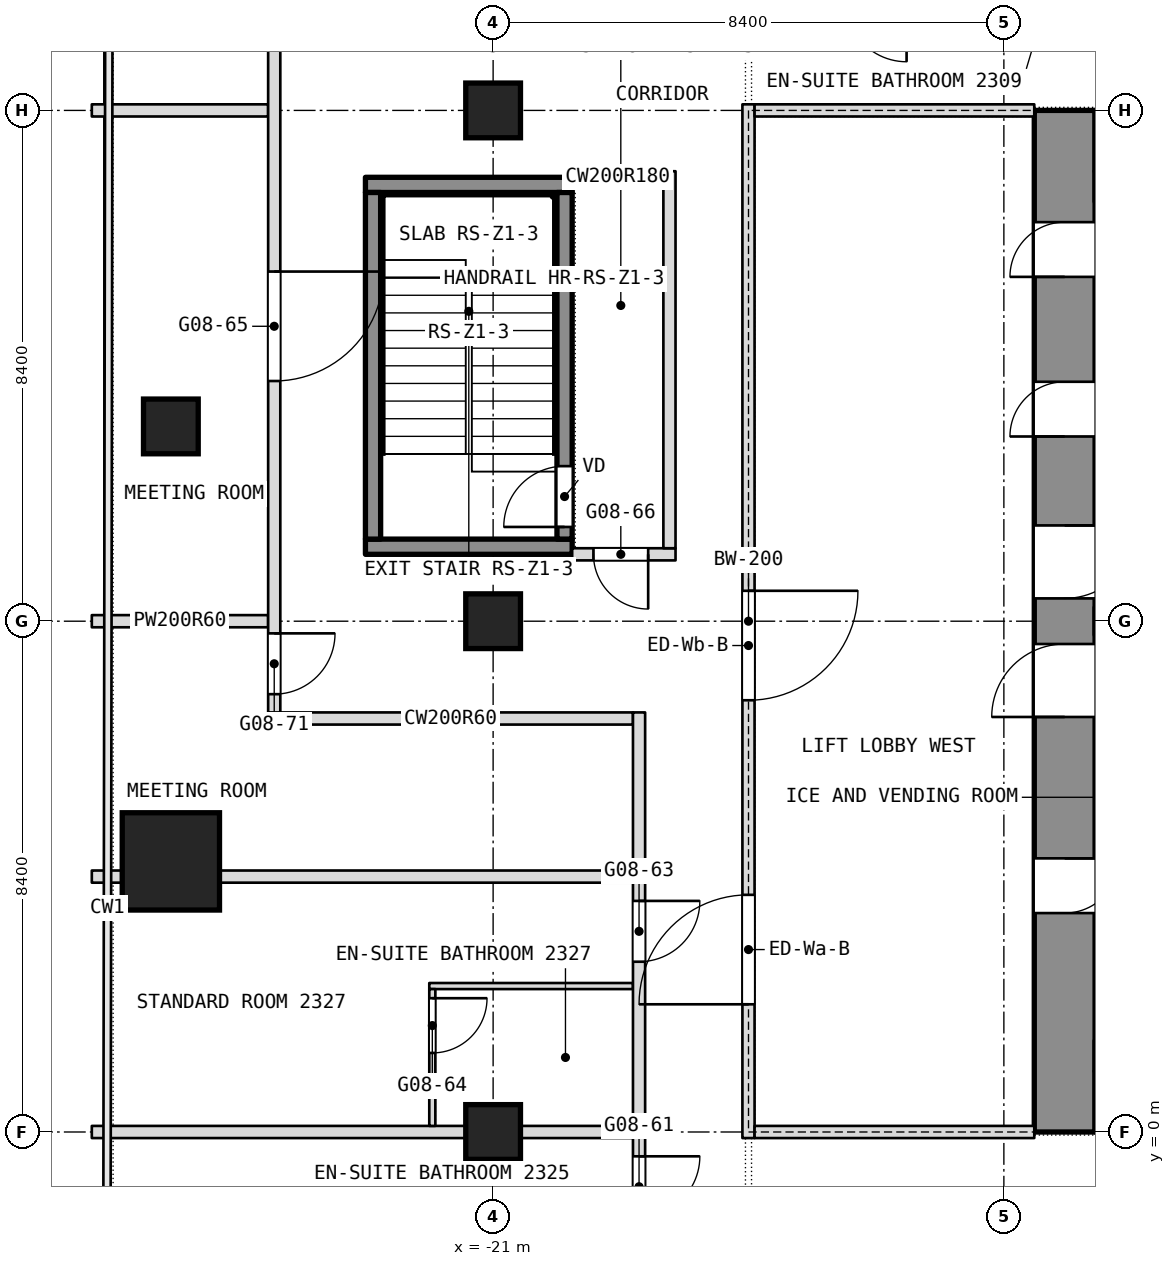
"""IFC4 building model, lengths in metres.
Left out: names, types, materials, properties, quantities, classifications, styles, units other than length and angle.
Written with IfcOpenShell. Run it as: python <this file> out.ifc"""

import sys

from ifc_helpers import new_model, si_unit, direction, frame, frame_2d, origin, origin_2d, place, context, subcontext, project, spatial, rectangle, extrude, element, fill, save


model = new_model("IFC4")
c1 = context("Model", 3, precision=1e-05, world=origin(), true_north=direction((0.0, 1.0)))
c2 = subcontext(c1, "Body", "Model", "MODEL_VIEW")
j1 = project(units=[si_unit("LENGTHUNIT", "METRE"), si_unit("PLANEANGLEUNIT", "RADIAN")], contexts=[c1])
p1 = place(None, origin())
s1 = spatial("IfcSite", under=j1, at=p1, CompositionType="ELEMENT")
p2 = place(p1, origin())
s2 = spatial("IfcBuilding", under=s1, at=p2, CompositionType="ELEMENT")
p3 = place(p2, frame((0.0, 0.0, 108.5)))
s3 = spatial("IfcBuildingStorey", under=s2, at=p3, CompositionType="ELEMENT", Elevation=108.5)
p4 = place(p3, frame((-11.6, 0.0, 0.0), z_axis=(0.0, 0.0, 1.0), x_axis=(0.0, 1.0, 0.0)))
e1 = element("IfcWall", 1, at=p4, inside=s3, PredefinedType="SHEAR", context=c2, shape_type="SweptSolid", body=[
    extrude(rectangle(XDim=16.8, YDim=1.0, at=frame_2d((8.4, 0.0))), origin(), (0.0, 0.0, 1.0), 3.6),
])
p5 = place(p4, frame((3.6, 0.0, 0.0)))
e2 = element("IfcOpeningElement", 2, at=p5, cuts=e1, PredefinedType="OPENING", context=c2, shape_type="SweptSolid", body=[
    extrude(rectangle(XDim=0.9, YDim=2.1, at=frame_2d((0.45, 1.05))), frame((0.0, 0.5, 0.0), z_axis=(0.0, -1.0, 0.0), x_axis=(1.0, 0.0, 0.0)), (0.0, 0.0, 1.0), 1.0),
])
p6 = place(p4, frame((6.825, 0.0, 0.0)))
e3 = element("IfcOpeningElement", 3, at=p6, cuts=e1, PredefinedType="OPENING", context=c2, shape_type="SweptSolid", body=[
    extrude(rectangle(XDim=1.2, YDim=2.1, at=frame_2d((0.6, 1.05))), frame((0.0, 0.5, 0.0), z_axis=(0.0, -1.0, 0.0), x_axis=(1.0, 0.0, 0.0)), (0.0, 0.0, 1.0), 1.0),
])
p7 = place(p4, frame((14.062, 0.0, 0.0)))
e4 = element("IfcOpeningElement", 4, at=p7, cuts=e1, PredefinedType="OPENING", context=c2, shape_type="SweptSolid", body=[
    extrude(rectangle(XDim=0.9, YDim=2.1, at=frame_2d((0.45, 1.05))), frame((0.0, 0.5, 0.0), z_axis=(0.0, -1.0, 0.0), x_axis=(1.0, 0.0, 0.0)), (0.0, 0.0, 1.0), 1.0),
])
p8 = place(p4, frame((11.438, 0.0, 0.0)))
e5 = element("IfcOpeningElement", 5, at=p8, cuts=e1, PredefinedType="OPENING", context=c2, shape_type="SweptSolid", body=[
    extrude(rectangle(XDim=0.9, YDim=2.1, at=frame_2d((0.45, 1.05))), frame((0.0, 0.5, 0.0), z_axis=(0.0, -1.0, 0.0), x_axis=(1.0, 0.0, 0.0)), (0.0, 0.0, 1.0), 1.0),
])
p9 = place(p4, frame((8.775, 0.0, 0.0)))
e6 = element("IfcOpeningElement", 6, at=p9, cuts=e1, PredefinedType="OPENING", context=c2, shape_type="SweptSolid", body=[
    extrude(rectangle(XDim=1.2, YDim=2.1, at=frame_2d((0.6, 1.05))), frame((0.0, 0.5, 0.0), z_axis=(0.0, -1.0, 0.0), x_axis=(1.0, 0.0, 0.0)), (0.0, 0.0, 1.0), 1.0),
])
p10 = place(p3, frame((-11.1, 8.4, 0.0), z_axis=(0.0, 0.0, 1.0), x_axis=(1.0, 0.0, 0.0)))
e7 = element("IfcWall", 7, at=p10, inside=s3, PredefinedType="SHEAR", context=c2, shape_type="SweptSolid", body=[
    extrude(rectangle(XDim=6.675, YDim=0.45, at=frame_2d((3.337, 0.0))), origin(), (0.0, 0.0, 1.0), 3.6),
])
p11 = place(p3, frame((-26.3, 4.45, 0.0), z_axis=(0.0, 0.0, 1.0), x_axis=(1.0, 0.0, 0.0)))
e8 = element("IfcColumn", 8, at=p11, inside=s3, PredefinedType="COLUMN", context=c2, shape_type="SweptSolid", body=[
    extrude(rectangle(XDim=1.6, YDim=1.6, at=origin_2d()), origin(), (0.0, 0.0, 1.0), 3.6),
])
for number, where, z_axis, x_axis in (
    (9, (-21.0, 0.0, 0.0), (0.0, 0.0, 1.0), (1.0, 0.0, 0.0)),
    (10, (-21.0, 8.4, 0.0), (0.0, 0.0, 1.0), (1.0, 0.0, 0.0)),
    (11, (-21.0, 16.8, 0.0), (0.0, 0.0, 1.0), (1.0, 0.0, 0.0)),
    (12, (-26.3, 11.603, 0.0), (0.0, 0.0, 1.0), (1.0, 0.0, 0.0)),
):
    element("IfcColumn", number, at=place(p3, frame(where, z_axis=z_axis, x_axis=x_axis)), inside=s3, PredefinedType="COLUMN", context=c2, shape_type="SweptSolid", body=[
        extrude(rectangle(XDim=0.9, YDim=0.9, at=origin_2d()), origin(), (0.0, 0.0, 1.0), 3.6),
    ])
p12 = place(p3, frame((-27.6, 0.0, 0.0), z_axis=(0.0, 0.0, 1.0), x_axis=(1.0, 0.0, 0.0)))
e13 = element("IfcWall", 13, at=p12, inside=s3, PredefinedType="PARTITIONING", context=c2, shape_type="SweptSolid", body=[
    extrude(rectangle(XDim=8.9, YDim=0.2, at=frame_2d((4.45, 0.0))), origin(), (0.0, 0.0, 1.0), 2.89),
])
p13 = place(p3, frame((-22.05, 2.4, 0.0), z_axis=(0.0, 0.0, 1.0), x_axis=(1.0, 0.0, 0.0)))
e14 = element("IfcWall", 14, at=p13, inside=s3, PredefinedType="PARTITIONING", context=c2, shape_type="SweptSolid", body=[
    extrude(rectangle(XDim=3.35, YDim=0.1, at=frame_2d((1.675, 0.0))), origin(), (0.0, 0.0, 1.0), 3.34),
])
p14 = place(p3, frame((-27.6, 4.2, 0.0), z_axis=(0.0, 0.0, 1.0), x_axis=(1.0, 0.0, 0.0)))
e15 = element("IfcWall", 15, at=p14, inside=s3, PredefinedType="PARTITIONING", context=c2, shape_type="SweptSolid", body=[
    extrude(rectangle(XDim=0.5, YDim=0.2, at=frame_2d((0.25, 0.0))), origin(), (0.0, 0.0, 1.0), 3.34),
])
p15 = place(p3, frame((-25.5, 4.2, 0.0), z_axis=(0.0, 0.0, 1.0), x_axis=(1.0, 0.0, 0.0)))
e16 = element("IfcWall", 16, at=p15, inside=s3, PredefinedType="PARTITIONING", context=c2, shape_type="SweptSolid", body=[
    extrude(rectangle(XDim=6.8, YDim=0.2, at=frame_2d((3.4, 0.0))), origin(), (0.0, 0.0, 1.0), 3.34),
])
p16 = place(p3, frame((-24.7, 6.8, 0.0), z_axis=(0.0, 0.0, 1.0), x_axis=(1.0, 0.0, 0.0)))
e17 = element("IfcWall", 17, at=p16, inside=s3, PredefinedType="PARTITIONING", context=c2, shape_type="SweptSolid", body=[
    extrude(rectangle(XDim=6.0, YDim=0.2, at=frame_2d((3.0, 0.0))), origin(), (0.0, 0.0, 1.0), 3.34),
])
p17 = place(p3, frame((-27.6, 8.4, 0.0), z_axis=(0.0, 0.0, 1.0), x_axis=(1.0, 0.0, 0.0)))
e18 = element("IfcWall", 18, at=p17, inside=s3, PredefinedType="PARTITIONING", context=c2, shape_type="SweptSolid", body=[
    extrude(rectangle(XDim=2.9, YDim=0.2, at=frame_2d((1.45, 0.0))), origin(), (0.0, 0.0, 1.0), 2.89),
])
p18 = place(p3, frame((-19.7, 9.5, 0.0), z_axis=(0.0, 0.0, 1.0), x_axis=(1.0, 0.0, 0.0)))
e19 = element("IfcWall", 19, at=p18, inside=s3, PredefinedType="PARTITIONING", context=c2, shape_type="SweptSolid", body=[
    extrude(rectangle(XDim=1.7, YDim=0.2, at=frame_2d((0.85, 0.0))), origin(), (0.0, 0.0, 1.0), 3.34),
])
p19 = place(p18, frame((0.35, 0.0, 0.0)))
e20 = element("IfcOpeningElement", 20, at=p19, cuts=e19, PredefinedType="OPENING", context=c2, shape_type="SweptSolid", body=[
    extrude(rectangle(XDim=0.9, YDim=2.1, at=frame_2d((0.45, 1.05))), frame((0.0, 0.1, 0.0), z_axis=(0.0, -1.0, 0.0), x_axis=(1.0, 0.0, 0.0)), (0.0, 0.0, 1.0), 0.2),
])
p20 = place(p3, frame((-19.7, 15.7, 0.0), z_axis=(0.0, 0.0, 1.0), x_axis=(1.0, 0.0, 0.0)))
e21 = element("IfcWall", 21, at=p20, inside=s3, PredefinedType="PARTITIONING", context=c2, shape_type="SweptSolid", body=[
    extrude(rectangle(XDim=1.5, YDim=0.2, at=frame_2d((0.75, 0.0))), origin(), (0.0, 0.0, 1.0), 3.34),
])
p21 = place(p3, frame((-27.6, 16.8, 0.0), z_axis=(0.0, 0.0, 1.0), x_axis=(1.0, 0.0, 0.0)))
e22 = element("IfcWall", 22, at=p21, inside=s3, PredefinedType="PARTITIONING", context=c2, shape_type="SweptSolid", body=[
    extrude(rectangle(XDim=2.9, YDim=0.2, at=frame_2d((1.45, 0.0))), origin(), (0.0, 0.0, 1.0), 2.89),
])
p22 = place(p3, frame((-18.1, 9.6, 0.0), z_axis=(0.0, 0.0, 1.0), x_axis=(0.0, 1.0, 0.0)))
e23 = element("IfcWall", 23, at=p22, inside=s3, PredefinedType="PARTITIONING", context=c2, shape_type="SweptSolid", body=[
    extrude(rectangle(XDim=6.2, YDim=0.2, at=frame_2d((3.1, 0.0))), origin(), (0.0, 0.0, 1.0), 3.34),
])
p23 = place(p3, frame((-18.6, -21.708, 0.0), z_axis=(0.0, 0.0, 1.0), x_axis=(0.0, 1.0, 0.0)))
e24 = element("IfcWall", 24, at=p23, inside=s3, PredefinedType="PARTITIONING", context=c2, shape_type="SweptSolid", body=[
    extrude(rectangle(XDim=28.608, YDim=0.2, at=frame_2d((14.304, 0.0))), origin(), (0.0, 0.0, 1.0), 3.34),
])
p24 = place(p23, frame((2.8, 0.0, 0.0)))
e25 = element("IfcOpeningElement", 25, at=p24, cuts=e24, PredefinedType="OPENING", context=c2, shape_type="SweptSolid", body=[
    extrude(rectangle(XDim=1.0, YDim=2.1, at=frame_2d((0.5, 1.05))), frame((0.0, 0.1, 0.0), z_axis=(0.0, -1.0, 0.0), x_axis=(1.0, 0.0, 0.0)), (0.0, 0.0, 1.0), 0.2),
])
p25 = place(p23, frame((7.708, 0.0, 0.0)))
e26 = element("IfcOpeningElement", 26, at=p25, cuts=e24, PredefinedType="OPENING", context=c2, shape_type="SweptSolid", body=[
    extrude(rectangle(XDim=1.0, YDim=2.1, at=frame_2d((0.5, 1.05))), frame((0.0, 0.1, 0.0), z_axis=(0.0, -1.0, 0.0), x_axis=(1.0, 0.0, 0.0)), (0.0, 0.0, 1.0), 0.2),
])
p26 = place(p23, frame((9.508, 0.0, 0.0)))
e27 = element("IfcOpeningElement", 27, at=p26, cuts=e24, PredefinedType="OPENING", context=c2, shape_type="SweptSolid", body=[
    extrude(rectangle(XDim=1.0, YDim=2.1, at=frame_2d((0.5, 1.05))), frame((0.0, 0.1, 0.0), z_axis=(0.0, -1.0, 0.0), x_axis=(1.0, 0.0, 0.0)), (0.0, 0.0, 1.0), 0.2),
])
p27 = place(p23, frame((13.708, 0.0, 0.0)))
e28 = element("IfcOpeningElement", 28, at=p27, cuts=e24, PredefinedType="OPENING", context=c2, shape_type="SweptSolid", body=[
    extrude(rectangle(XDim=1.0, YDim=2.1, at=frame_2d((0.5, 1.05))), frame((0.0, 0.1, 0.0), z_axis=(0.0, -1.0, 0.0), x_axis=(1.0, 0.0, 0.0)), (0.0, 0.0, 1.0), 0.2),
])
p28 = place(p23, frame((20.308, 0.0, 0.0)))
e29 = element("IfcOpeningElement", 29, at=p28, cuts=e24, PredefinedType="OPENING", context=c2, shape_type="SweptSolid", body=[
    extrude(rectangle(XDim=1.0, YDim=2.1, at=frame_2d((0.5, 1.05))), frame((0.0, 0.1, 0.0), z_axis=(0.0, -1.0, 0.0), x_axis=(1.0, 0.0, 0.0)), (0.0, 0.0, 1.0), 0.2),
])
p29 = place(p23, frame((24.508, 0.0, 0.0)))
e30 = element("IfcOpeningElement", 30, at=p29, cuts=e24, PredefinedType="OPENING", context=c2, shape_type="SweptSolid", body=[
    extrude(rectangle(XDim=1.0, YDim=2.1, at=frame_2d((0.5, 1.05))), frame((0.0, 0.1, 0.0), z_axis=(0.0, -1.0, 0.0), x_axis=(1.0, 0.0, 0.0)), (0.0, 0.0, 1.0), 0.2),
])
p30 = place(p3, frame((-22.0, 0.1, 0.0), z_axis=(0.0, 0.0, 1.0), x_axis=(0.0, 1.0, 0.0)))
e31 = element("IfcWall", 31, at=p30, inside=s3, PredefinedType="PARTITIONING", context=c2, shape_type="SweptSolid", body=[
    extrude(rectangle(XDim=2.25, YDim=0.1, at=frame_2d((1.125, 0.0))), origin(), (0.0, 0.0, 1.0), 3.34),
])
p31 = place(p30, frame((1.2, 0.0, 0.0)))
e32 = element("IfcOpeningElement", 32, at=p31, cuts=e31, PredefinedType="OPENING", context=c2, shape_type="SweptSolid", body=[
    extrude(rectangle(XDim=0.9, YDim=2.1, at=frame_2d((0.45, 1.05))), frame((0.0, 0.05, 0.0), z_axis=(0.0, -1.0, 0.0), x_axis=(1.0, 0.0, 0.0)), (0.0, 0.0, 1.0), 0.1),
])
p32 = place(p3, frame((-24.6, 6.9, 0.0), z_axis=(0.0, 0.0, 1.0), x_axis=(0.0, 1.0, 0.0)))
e33 = element("IfcWall", 33, at=p32, inside=s3, PredefinedType="PARTITIONING", context=c2, shape_type="SweptSolid", body=[
    extrude(rectangle(XDim=11.6, YDim=0.2, at=frame_2d((5.8, 0.0))), origin(), (0.0, 0.0, 1.0), 3.34),
])
p33 = place(p32, frame((5.45, 0.0, 0.0)))
e34 = element("IfcOpeningElement", 34, at=p33, cuts=e33, PredefinedType="OPENING", context=c2, shape_type="SweptSolid", body=[
    extrude(rectangle(XDim=1.8, YDim=2.1, at=frame_2d((0.9, 1.05))), frame((0.0, 0.1, 0.0), z_axis=(0.0, -1.0, 0.0), x_axis=(1.0, 0.0, 0.0)), (0.0, 0.0, 1.0), 0.2),
])
p34 = place(p32, frame((0.3, 0.0, 0.0)))
e35 = element("IfcOpeningElement", 35, at=p34, cuts=e33, PredefinedType="OPENING", context=c2, shape_type="SweptSolid", body=[
    extrude(rectangle(XDim=1.0, YDim=2.1, at=frame_2d((0.5, 1.05))), frame((0.0, 0.1, 0.0), z_axis=(0.0, -1.0, 0.0), x_axis=(1.0, 0.0, 0.0)), (0.0, 0.0, 1.0), 0.2),
])
p35 = place(p3, frame((-16.8, -0.1, 0.0), z_axis=(0.0, 0.0, 1.0), x_axis=(0.0, 1.0, 0.0)))
e36 = element("IfcWall", 36, at=p35, inside=s3, PredefinedType="PARTITIONING", context=c2, shape_type="SweptSolid", body=[
    extrude(rectangle(XDim=17.0, YDim=0.2, at=frame_2d((8.5, 0.0))), origin(), (0.0, 0.0, 1.0), 3.34),
])
p36 = place(p35, frame((2.2, 0.0, 0.0)))
e37 = element("IfcOpeningElement", 37, at=p36, cuts=e36, PredefinedType="OPENING", context=c2, shape_type="SweptSolid", body=[
    extrude(rectangle(XDim=1.8, YDim=2.1, at=frame_2d((0.9, 1.05))), frame((0.0, 0.1, 0.0), z_axis=(0.0, -1.0, 0.0), x_axis=(1.0, 0.0, 0.0)), (0.0, 0.0, 1.0), 0.2),
])
p37 = place(p35, frame((7.2, 0.0, 0.0)))
e38 = element("IfcOpeningElement", 38, at=p37, cuts=e36, PredefinedType="OPENING", context=c2, shape_type="SweptSolid", body=[
    extrude(rectangle(XDim=1.8, YDim=2.1, at=frame_2d((0.9, 1.05))), frame((0.0, 0.1, 0.0), z_axis=(0.0, -1.0, 0.0), x_axis=(1.0, 0.0, 0.0)), (0.0, 0.0, 1.0), 0.2),
])
for number, where, z_axis, x_axis in (
    (39, (-16.7, 0.0, 0.0), (0.0, 0.0, 1.0), (1.0, 0.0, 0.0)),
    (40, (-16.7, 16.8, 0.0), (0.0, 0.0, 1.0), (1.0, 0.0, 0.0)),
):
    element("IfcWall", number, at=place(p3, frame(where, z_axis=z_axis, x_axis=x_axis)), inside=s3, PredefinedType="PARTITIONING", context=c2, shape_type="SweptSolid", body=[
        extrude(rectangle(XDim=4.6, YDim=0.2, at=frame_2d((2.3, 0.0))), origin(), (0.0, 0.0, 1.0), 2.89),
    ])
for number, where, z_axis, x_axis in (
    (41, (-23.1, 9.625, 0.1), (0.0, 0.0, 1.0), (1.0, 0.0, 0.0)),
    (42, (-23.1, 15.575, 0.1), (0.0, 0.0, 1.0), (1.0, 0.0, 0.0)),
):
    element("IfcWall", number, at=place(p3, frame(where, z_axis=z_axis, x_axis=x_axis)), inside=s3, PredefinedType="SHEAR", context=c2, shape_type="SweptSolid", body=[
        extrude(rectangle(XDim=3.4, YDim=0.25, at=frame_2d((1.7, 0.0))), origin(), (0.0, 0.0, 1.0), 3.6),
    ])
p38 = place(p3, frame((-22.975, 9.75, 0.1), z_axis=(0.0, 0.0, 1.0), x_axis=(0.0, 1.0, 0.0)))
e43 = element("IfcWall", 43, at=p38, inside=s3, PredefinedType="SHEAR", context=c2, shape_type="SweptSolid", body=[
    extrude(rectangle(XDim=5.7, YDim=0.25, at=frame_2d((2.85, 0.0))), origin(), (0.0, 0.0, 1.0), 3.6),
])
p39 = place(p3, frame((-19.825, 9.75, 0.1), z_axis=(0.0, 0.0, 1.0), x_axis=(0.0, 1.0, 0.0)))
e44 = element("IfcWall", 44, at=p39, inside=s3, PredefinedType="SHEAR", context=c2, shape_type="SweptSolid", body=[
    extrude(rectangle(XDim=5.7, YDim=0.25, at=frame_2d((2.85, 0.0))), origin(), (0.0, 0.0, 1.0), 3.6),
])
p40 = place(p39, frame((0.2, 0.0, 0.0)))
e45 = element("IfcOpeningElement", 45, at=p40, cuts=e44, PredefinedType="OPENING", context=c2, shape_type="SweptSolid", body=[
    extrude(rectangle(XDim=1.0, YDim=2.1, at=frame_2d((0.5, 1.05))), frame((0.0, 0.125, 0.0), z_axis=(0.0, -1.0, 0.0), x_axis=(1.0, 0.0, 0.0)), (0.0, 0.0, 1.0), 0.25),
])
p41 = place(p19, origin())
e46 = element("IfcDoor", 46, at=p41, inside=s3, OperationType="SINGLE_SWING_RIGHT", PredefinedType="DOOR", context=c2, shape_type="SweptSolid", body=[
    extrude(rectangle(XDim=0.9, YDim=2.1, at=frame_2d((0.45, 1.05))), frame((0.0, 0.025, 0.0), z_axis=(0.0, -1.0, 0.0), x_axis=(1.0, 0.0, 0.0)), (0.0, 0.0, 1.0), 0.05),
])
fill(e20, e46)
p42 = place(p28, origin())
e47 = element("IfcDoor", 47, at=p42, inside=s3, OperationType="SINGLE_SWING_RIGHT", PredefinedType="DOOR", context=c2, shape_type="SweptSolid", body=[
    extrude(rectangle(XDim=1.0, YDim=2.1, at=frame_2d((0.5, 1.05))), frame((0.0, 0.025, 0.0), z_axis=(0.0, -1.0, 0.0), x_axis=(1.0, 0.0, 0.0)), (0.0, 0.0, 1.0), 0.05),
])
fill(e29, e47)
p43 = place(p29, origin())
e48 = element("IfcDoor", 48, at=p43, inside=s3, OperationType="SINGLE_SWING_RIGHT", PredefinedType="DOOR", context=c2, shape_type="SweptSolid", body=[
    extrude(rectangle(XDim=1.0, YDim=2.1, at=frame_2d((0.5, 1.05))), frame((0.0, 0.025, 0.0), z_axis=(0.0, -1.0, 0.0), x_axis=(1.0, 0.0, 0.0)), (0.0, 0.0, 1.0), 0.05),
])
fill(e30, e48)
p44 = place(p31, origin())
e49 = element("IfcDoor", 49, at=p44, inside=s3, OperationType="SINGLE_SWING_LEFT", PredefinedType="DOOR", context=c2, shape_type="SweptSolid", body=[
    extrude(rectangle(XDim=0.9, YDim=2.1, at=frame_2d((0.45, 1.05))), frame((0.0, 0.025, 0.0), z_axis=(0.0, -1.0, 0.0), x_axis=(1.0, 0.0, 0.0)), (0.0, 0.0, 1.0), 0.05),
])
fill(e32, e49)
p45 = place(p33, origin())
e50 = element("IfcDoor", 50, at=p45, inside=s3, OperationType="DOUBLE_DOOR_SINGLE_SWING", PredefinedType="DOOR", context=c2, shape_type="SweptSolid", body=[
    extrude(rectangle(XDim=1.8, YDim=2.1, at=frame_2d((0.9, 1.05))), frame((0.0, 0.025, 0.0), z_axis=(0.0, -1.0, 0.0), x_axis=(1.0, 0.0, 0.0)), (0.0, 0.0, 1.0), 0.05),
])
fill(e34, e50)
p46 = place(p34, origin())
e51 = element("IfcDoor", 51, at=p46, inside=s3, OperationType="SINGLE_SWING_LEFT", PredefinedType="DOOR", context=c2, shape_type="SweptSolid", body=[
    extrude(rectangle(XDim=1.0, YDim=2.1, at=frame_2d((0.5, 1.05))), frame((0.0, 0.025, 0.0), z_axis=(0.0, -1.0, 0.0), x_axis=(1.0, 0.0, 0.0)), (0.0, 0.0, 1.0), 0.05),
])
fill(e35, e51)
p47 = place(p40, origin())
e52 = element("IfcDoor", 52, at=p47, inside=s3, OperationType="SINGLE_SWING_LEFT", PredefinedType="DOOR", context=c2, shape_type="SweptSolid", body=[
    extrude(rectangle(XDim=1.0, YDim=2.1, at=frame_2d((0.5, 1.05))), frame((0.0, 0.025, 0.0), z_axis=(0.0, -1.0, 0.0), x_axis=(1.0, 0.0, 0.0)), (0.0, 0.0, 1.0), 0.05),
])
fill(e45, e52)
p48 = place(p5, origin())
e53 = element("IfcDoor", 53, at=p48, inside=s3, OperationType="SINGLE_SWING_LEFT", PredefinedType="DOOR", context=c2, shape_type="SweptSolid", body=[
    extrude(rectangle(XDim=0.9, YDim=2.1, at=frame_2d((0.45, 1.05))), frame((0.0, 0.025, 0.0), z_axis=(0.0, -1.0, 0.0), x_axis=(1.0, 0.0, 0.0)), (0.0, 0.0, 1.0), 0.05),
])
fill(e2, e53)
p49 = place(p6, origin())
e54 = element("IfcDoor", 54, at=p49, inside=s3, OperationType="SINGLE_SWING_LEFT", PredefinedType="DOOR", context=c2, shape_type="SweptSolid", body=[
    extrude(rectangle(XDim=1.2, YDim=2.1, at=frame_2d((0.6, 1.05))), frame((0.0, 0.025, 0.0), z_axis=(0.0, -1.0, 0.0), x_axis=(1.0, 0.0, 0.0)), (0.0, 0.0, 1.0), 0.05),
])
fill(e3, e54)
p50 = place(p7, origin())
e55 = element("IfcDoor", 55, at=p50, inside=s3, OperationType="SINGLE_SWING_LEFT", PredefinedType="DOOR", context=c2, shape_type="SweptSolid", body=[
    extrude(rectangle(XDim=0.9, YDim=2.1, at=frame_2d((0.45, 1.05))), frame((0.0, 0.025, 0.0), z_axis=(0.0, -1.0, 0.0), x_axis=(1.0, 0.0, 0.0)), (0.0, 0.0, 1.0), 0.05),
])
fill(e4, e55)
p51 = place(p8, origin())
e56 = element("IfcDoor", 56, at=p51, inside=s3, OperationType="SINGLE_SWING_LEFT", PredefinedType="DOOR", context=c2, shape_type="SweptSolid", body=[
    extrude(rectangle(XDim=0.9, YDim=2.1, at=frame_2d((0.45, 1.05))), frame((0.0, 0.025, 0.0), z_axis=(0.0, -1.0, 0.0), x_axis=(1.0, 0.0, 0.0)), (0.0, 0.0, 1.0), 0.05),
])
fill(e5, e56)
p52 = place(p9, origin())
e57 = element("IfcDoor", 57, at=p52, inside=s3, OperationType="SINGLE_SWING_LEFT", PredefinedType="DOOR", context=c2, shape_type="SweptSolid", body=[
    extrude(rectangle(XDim=1.2, YDim=2.1, at=frame_2d((0.6, 1.05))), frame((0.0, 0.025, 0.0), z_axis=(0.0, -1.0, 0.0), x_axis=(1.0, 0.0, 0.0)), (0.0, 0.0, 1.0), 0.05),
])
fill(e6, e57)
p53 = place(p36, origin())
e58 = element("IfcDoor", 58, at=p53, inside=s3, OperationType="DOUBLE_DOOR_SINGLE_SWING", PredefinedType="DOOR", context=c2, shape_type="SweptSolid", body=[
    extrude(rectangle(XDim=1.8, YDim=2.1, at=frame_2d((0.9, 1.05))), frame((0.0, 0.025, 0.0), z_axis=(0.0, -1.0, 0.0), x_axis=(1.0, 0.0, 0.0)), (0.0, 0.0, 1.0), 0.05),
])
fill(e37, e58)
p54 = place(p37, origin())
e59 = element("IfcDoor", 59, at=p54, inside=s3, OperationType="DOUBLE_DOOR_SINGLE_SWING", PredefinedType="DOOR", context=c2, shape_type="SweptSolid", body=[
    extrude(rectangle(XDim=1.8, YDim=2.1, at=frame_2d((0.9, 1.05))), frame((0.0, 0.025, 0.0), z_axis=(0.0, -1.0, 0.0), x_axis=(1.0, 0.0, 0.0)), (0.0, 0.0, 1.0), 0.05),
])
fill(e38, e59)
save(model, sys.argv[1])
